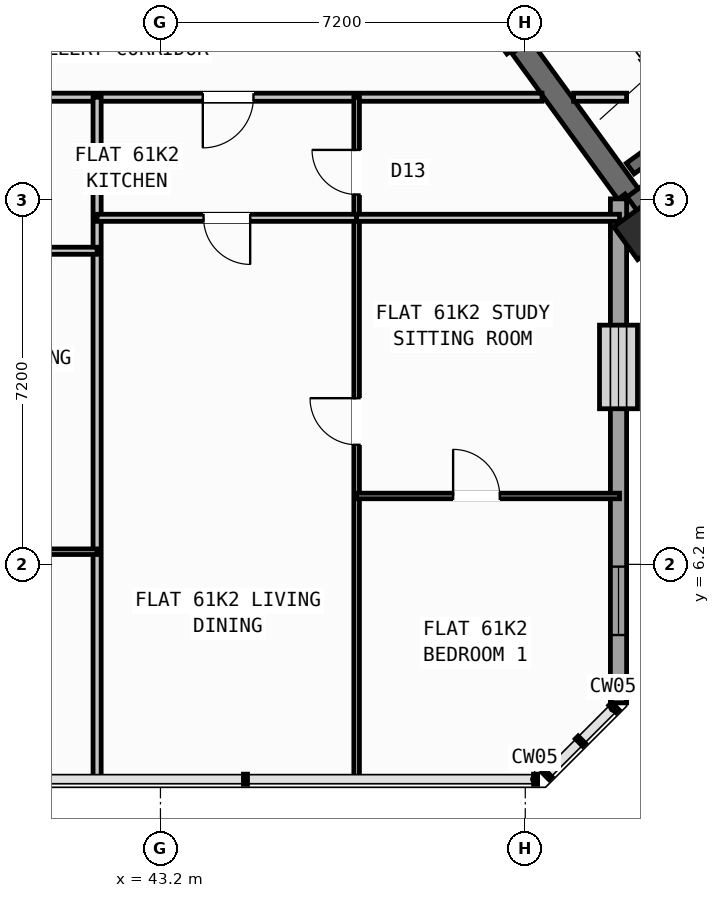
"""IFC4 building model, lengths in metres.
Left out: names, types, materials, properties, quantities, classifications, styles, units other than length and angle.
Written with IfcOpenShell. Run it as: python <this file> out.ifc"""

import sys

from ifc_helpers import new_model, si_unit, direction, frame, frame_2d, origin, origin_2d, place, context, subcontext, project, spatial, rectangle, hollow_rectangle, extrude, source, transform, mapped, element, fill, save


model = new_model("IFC4")
c1 = context("Model", 3, precision=1e-05, world=origin(), true_north=direction((0.0, 1.0)))
c2 = subcontext(c1, "Body", "Model", "MODEL_VIEW")
j1 = project(units=[si_unit("LENGTHUNIT", "METRE"), si_unit("PLANEANGLEUNIT", "RADIAN")], contexts=[c1])
p1 = place(None, origin())
s1 = spatial("IfcSite", under=j1, at=p1, CompositionType="ELEMENT")
p2 = place(p1, origin())
s2 = spatial("IfcBuilding", under=s1, at=p2, CompositionType="ELEMENT")
p3 = place(p2, frame((0.0, 0.0, 242.1)))
s3 = spatial("IfcBuildingStorey", under=s2, at=p3, CompositionType="ELEMENT", Elevation=242.1)
p4 = place(p3, frame((52.399, 13.169, 0.0), z_axis=(0.0, 0.0, 1.0), x_axis=(0.809022352778, 0.587777877013, 0.0)))
e1 = element("IfcWall", 1, at=p4, inside=s3, PredefinedType="SHEAR", context=c2, shape_type="SweptSolid", body=[
    extrude(rectangle(XDim=12.24, YDim=0.45, at=frame_2d((6.12, 0.0))), origin(), (0.0, 0.0, 1.0), 3.32),
])
p5 = place(p3, frame((52.449, 13.483, 0.0), z_axis=(0.0, 0.0, 1.0), x_axis=(-0.587819244441, 0.808992296542, 0.0)))
e2 = element("IfcWall", 2, at=p5, inside=s3, PredefinedType="SHEAR", context=c2, shape_type="SweptSolid", body=[
    extrude(rectangle(XDim=3.625, YDim=0.45, at=frame_2d((1.812, 0.0))), origin(), (0.0, 0.0, 1.0), 3.32),
])
m1 = source(origin(), c2, "Body", "SweptSolid", [
    extrude(hollow_rectangle(XDim=0.8, YDim=0.8, WallThickness=0.032, at=origin_2d()), origin(), (0.0, 0.0, 1.0), 3.6),
])
p6 = place(p3, frame((52.705, 12.773, 0.0), z_axis=(0.0, 0.0, 1.0), x_axis=(0.809016994375, 0.587785252292, 0.0)))
e3 = element("IfcColumn", 3, at=p6, inside=s3, PredefinedType="COLUMN", context=c2, shape_type="MappedRepresentation", body=[
    mapped(m1, transform((0.0, 0.0, 0.0), scale=1.0)),
])
p7 = place(p3, frame((56.581, 7.439, 0.0), z_axis=(0.0, 0.0, 1.0), x_axis=(-0.587776558368, 0.809023310809, 0.0)))
e4 = element("IfcWall", 4, at=p7, inside=s3, PredefinedType="STANDARD", context=c2, shape_type="SweptSolid", body=[
    extrude(rectangle(XDim=7.385, YDim=0.32, at=frame_2d((3.693, 0.0))), origin(), (0.0, 0.0, 1.0), 2.845),
])
p8 = place(p7, frame((1.731, 0.0, 0.9)))
e5 = element("IfcOpeningElement", 5, at=p8, cuts=e4, PredefinedType="OPENING", context=c2, shape_type="SweptSolid", body=[
    extrude(rectangle(XDim=1.65, YDim=1.45, at=frame_2d((0.825, 0.725))), frame((0.0, 0.17, 0.0), z_axis=(0.0, -1.0, 0.0), x_axis=(1.0, 0.0, 0.0)), (0.0, 0.0, 1.0), 0.34),
])
p9 = place(p3, frame((52.24, 13.414, 0.0), z_axis=(0.0, 0.0, 1.0), x_axis=(0.0, -1.0, 0.0)))
e6 = element("IfcWall", 6, at=p9, inside=s3, PredefinedType="STANDARD", context=c2, shape_type="SweptSolid", body=[
    extrude(rectangle(XDim=9.948, YDim=0.32, at=frame_2d((4.974, 0.0))), origin(), (0.0, 0.0, 1.0), 3.32),
])
p10 = place(p9, frame((2.492, 0.0, 0.9)))
e7 = element("IfcOpeningElement", 7, at=p10, cuts=e6, PredefinedType="OPENING", context=c2, shape_type="SweptSolid", body=[
    extrude(rectangle(XDim=1.65, YDim=1.45, at=frame_2d((0.825, 0.725))), frame((0.0, 0.17, 0.0), z_axis=(0.0, -1.0, 0.0), x_axis=(1.0, 0.0, 0.0)), (0.0, 0.0, 1.0), 0.34),
])
p11 = place(p9, frame((7.258, 0.0, 0.9)))
e8 = element("IfcOpeningElement", 8, at=p11, cuts=e6, PredefinedType="OPENING", context=c2, shape_type="SweptSolid", body=[
    extrude(rectangle(XDim=1.35, YDim=1.45, at=frame_2d((0.675, 0.725))), frame((0.0, 0.17, 0.0), z_axis=(0.0, -1.0, 0.0), x_axis=(1.0, 0.0, 0.0)), (0.0, 0.0, 1.0), 0.34),
])
p12 = place(p3, frame((52.472, 14.013, 0.0), z_axis=(0.0, 0.0, 1.0), x_axis=(0.809028366311, 0.587769599847, 0.0)))
e9 = element("IfcWall", 9, at=p12, inside=s3, PredefinedType="SHEAR", context=c2, shape_type="SweptSolid", body=[
    extrude(rectangle(XDim=7.33, YDim=0.26, at=frame_2d((3.665, 0.0))), origin(), (0.0, 0.0, 1.0), 3.32),
])
p13 = place(p3, frame((35.178, 15.42, 0.0), z_axis=(0.0, 0.0, 1.0), x_axis=(1.0, 0.0, 0.0)))
e10 = element("IfcWall", 10, at=p13, inside=s3, PredefinedType="PARTITIONING", context=c2, shape_type="SweptSolid", body=[
    extrude(rectangle(XDim=15.552, YDim=0.16, at=frame_2d((7.776, 0.0))), origin(), (0.0, 0.0, 1.0), 3.31),
])
p14 = place(p13, frame((1.028, 0.0, 0.0)))
e11 = element("IfcOpeningElement", 11, at=p14, cuts=e10, PredefinedType="OPENING", context=c2, shape_type="SweptSolid", body=[
    extrude(rectangle(XDim=1.0, YDim=2.1, at=frame_2d((0.5, 1.05))), frame((0.0, 0.09, 0.0), z_axis=(0.0, -1.0, 0.0), x_axis=(1.0, 0.0, 0.0)), (0.0, 0.0, 1.0), 0.18),
])
p15 = place(p13, frame((8.858, 0.0, 0.0)))
e12 = element("IfcOpeningElement", 12, at=p15, cuts=e10, PredefinedType="OPENING", context=c2, shape_type="SweptSolid", body=[
    extrude(rectangle(XDim=1.0, YDim=2.1, at=frame_2d((0.5, 1.05))), frame((0.0, 0.09, 0.0), z_axis=(0.0, -1.0, 0.0), x_axis=(1.0, 0.0, 0.0)), (0.0, 0.0, 1.0), 0.18),
])
p16 = place(p3, frame((51.354, 15.42, 0.0), z_axis=(0.0, 0.0, 1.0), x_axis=(1.0, 0.0, 0.0)))
e13 = element("IfcWall", 13, at=p16, inside=s3, PredefinedType="PARTITIONING", context=c2, shape_type="SweptSolid", body=[
    extrude(rectangle(XDim=1.046, YDim=0.16, at=frame_2d((0.523, 0.0))), origin(), (0.0, 0.0, 1.0), 3.31),
])
p17 = place(p3, frame((50.119, 16.333, 0.0), z_axis=(0.0, 0.0, 1.0), x_axis=(-0.587749856981, 0.809042709391, 0.0)))
e14 = element("IfcWall", 14, at=p17, inside=s3, PredefinedType="STANDARD", context=c2, shape_type="SweptSolid", body=[
    extrude(rectangle(XDim=2.96, YDim=0.2, at=frame_2d((1.48, 0.0))), origin(), (0.0, 0.0, 1.0), 3.31),
])
p18 = place(p17, frame((0.53, 0.0, 0.0)))
e15 = element("IfcOpeningElement", 15, at=p18, cuts=e14, PredefinedType="OPENING", context=c2, shape_type="SweptSolid", body=[
    extrude(rectangle(XDim=1.5, YDim=2.15, at=frame_2d((0.75, 1.075))), frame((0.0, 0.11, 0.0), z_axis=(0.0, -1.0, 0.0), x_axis=(1.0, 0.0, 0.0)), (0.0, 0.0, 1.0), 0.22),
])
p19 = place(p3, frame((41.95, 1.96, 0.0), z_axis=(0.0, 0.0, 1.0), x_axis=(0.0, 1.0, 0.0)))
e16 = element("IfcWall", 16, at=p19, inside=s3, PredefinedType="PARTITIONING", context=c2, shape_type="SweptSolid", body=[
    extrude(rectangle(XDim=13.46, YDim=0.16, at=frame_2d((6.73, 0.0))), origin(), (0.0, 0.0, 1.0), 3.31),
])
p20 = place(p3, frame((37.813, 12.39, 0.0), z_axis=(0.0, 0.0, 1.0), x_axis=(1.0, 0.0, 0.0)))
e17 = element("IfcWall", 17, at=p20, inside=s3, PredefinedType="PLUMBINGWALL", context=c2, shape_type="SweptSolid", body=[
    extrude(rectangle(XDim=4.137, YDim=0.14, at=frame_2d((2.068, 0.0))), origin(), (0.0, 0.0, 1.0), 2.495),
])
p21 = place(p3, frame((37.813, 6.45, 0.0), z_axis=(0.0, 0.0, 1.0), x_axis=(1.0, 0.0, 0.0)))
e18 = element("IfcWall", 18, at=p21, inside=s3, PredefinedType="PARTITIONING", context=c2, shape_type="SweptSolid", body=[
    extrude(rectangle(XDim=4.137, YDim=0.11, at=frame_2d((2.068, 0.0))), origin(), (0.0, 0.0, 1.0), 3.31),
])
p22 = place(p21, frame((1.608, 0.0, 0.0)))
e19 = element("IfcOpeningElement", 19, at=p22, cuts=e18, PredefinedType="OPENING", context=c2, shape_type="SweptSolid", body=[
    extrude(rectangle(XDim=0.92, YDim=2.08, at=frame_2d((0.46, 1.04))), frame((0.0, 0.065, 0.0), z_axis=(0.0, -1.0, 0.0), x_axis=(1.0, 0.0, 0.0)), (0.0, 0.0, 1.0), 0.13),
])
p23 = place(p3, frame((47.072, 1.96, 0.0), z_axis=(0.0, 0.0, 1.0), x_axis=(0.0, 1.0, 0.0)))
e20 = element("IfcWall", 20, at=p23, inside=s3, PredefinedType="PARTITIONING", context=c2, shape_type="SweptSolid", body=[
    extrude(rectangle(XDim=13.46, YDim=0.11, at=frame_2d((6.73, 0.0))), origin(), (0.0, 0.0, 1.0), 3.31),
])
p24 = place(p23, frame((6.6, 0.0, 0.0)))
e21 = element("IfcOpeningElement", 21, at=p24, cuts=e20, PredefinedType="OPENING", context=c2, shape_type="SweptSolid", body=[
    extrude(rectangle(XDim=0.92, YDim=2.08, at=frame_2d((0.46, 1.04))), frame((0.0, 0.065, 0.0), z_axis=(0.0, -1.0, 0.0), x_axis=(1.0, 0.0, 0.0)), (0.0, 0.0, 1.0), 0.13),
])
p25 = place(p23, frame((11.54, 0.0, 0.0)))
e22 = element("IfcOpeningElement", 22, at=p25, cuts=e20, PredefinedType="OPENING", context=c2, shape_type="SweptSolid", body=[
    extrude(rectangle(XDim=0.88, YDim=2.08, at=frame_2d((0.44, 1.04))), frame((0.0, 0.065, 0.0), z_axis=(0.0, -1.0, 0.0), x_axis=(1.0, 0.0, 0.0)), (0.0, 0.0, 1.0), 0.13),
])
p26 = place(p3, frame((41.95, 13.04, 0.0), z_axis=(0.0, 0.0, 1.0), x_axis=(1.0, 0.0, 0.0)))
e23 = element("IfcWall", 23, at=p26, inside=s3, PredefinedType="PLUMBINGWALL", context=c2, shape_type="SweptSolid", body=[
    extrude(rectangle(XDim=5.122, YDim=0.14, at=frame_2d((2.561, 0.0))), origin(), (0.0, 0.0, 1.0), 3.31),
])
p27 = place(p26, frame((2.101, 0.0, 0.0)))
e24 = element("IfcOpeningElement", 24, at=p27, cuts=e23, PredefinedType="OPENING", context=c2, shape_type="SweptSolid", body=[
    extrude(rectangle(XDim=0.92, YDim=2.08, at=frame_2d((0.46, 1.04))), frame((0.0, 0.08, 0.0), z_axis=(0.0, -1.0, 0.0), x_axis=(1.0, 0.0, 0.0)), (0.0, 0.0, 1.0), 0.16),
])
p28 = place(p3, frame((47.072, 13.04, 0.0), z_axis=(0.0, 0.0, 1.0), x_axis=(1.0, 0.0, 0.0)))
e25 = element("IfcWall", 25, at=p28, inside=s3, PredefinedType="PLUMBINGWALL", context=c2, shape_type="SweptSolid", body=[
    extrude(rectangle(XDim=5.188, YDim=0.14, at=frame_2d((2.594, 0.0))), origin(), (0.0, 0.0, 1.0), 2.495),
])
p29 = place(p3, frame((47.072, 7.55, 0.0), z_axis=(0.0, 0.0, 1.0), x_axis=(1.0, 0.0, 0.0)))
e26 = element("IfcWall", 26, at=p29, inside=s3, PredefinedType="PARTITIONING", context=c2, shape_type="SweptSolid", body=[
    extrude(rectangle(XDim=5.188, YDim=0.11, at=frame_2d((2.594, 0.0))), origin(), (0.0, 0.0, 1.0), 3.31),
])
p30 = place(p29, frame((1.904, 0.0, 0.0)))
e27 = element("IfcOpeningElement", 27, at=p30, cuts=e26, PredefinedType="OPENING", context=c2, shape_type="SweptSolid", body=[
    extrude(rectangle(XDim=0.92, YDim=2.08, at=frame_2d((0.46, 1.04))), frame((0.0, 0.065, 0.0), z_axis=(0.0, -1.0, 0.0), x_axis=(1.0, 0.0, 0.0)), (0.0, 0.0, 1.0), 0.13),
])
m2 = source(origin(), c2, "Body", "SweptSolid", [
    extrude(rectangle(XDim=1.65, YDim=1.45, at=frame_2d((0.825, 0.725))), frame((0.0, 0.03, 0.0), z_axis=(0.0, -1.0, 0.0), x_axis=(1.0, 0.0, 0.0)), (0.0, 0.0, 1.0), 0.06),
])
p31 = place(p10, origin())
e28 = element("IfcWindow", 28, at=p31, inside=s3, PartitioningType="SINGLE_PANEL", PredefinedType="WINDOW", context=c2, shape_type="MappedRepresentation", body=[
    mapped(m2, transform((0.0, 0.0, 0.0), scale=1.0)),
])
fill(e7, e28)
m3 = source(origin(), c2, "Body", "SweptSolid", [
    extrude(rectangle(XDim=1.35, YDim=1.45, at=frame_2d((0.675, 0.725))), frame((0.0, 0.03, 0.0), z_axis=(0.0, -1.0, 0.0), x_axis=(1.0, 0.0, 0.0)), (0.0, 0.0, 1.0), 0.06),
])
p32 = place(p11, origin())
e29 = element("IfcWindow", 29, at=p32, inside=s3, PartitioningType="SINGLE_PANEL", PredefinedType="WINDOW", context=c2, shape_type="MappedRepresentation", body=[
    mapped(m3, transform((0.0, 0.0, 0.0), scale=1.0)),
])
fill(e8, e29)
m4 = source(origin(), c2, "Body", "SweptSolid", [
    extrude(rectangle(XDim=0.92, YDim=2.08, at=frame_2d((0.46, 1.04))), frame((0.0, 0.025, 0.0), z_axis=(0.0, -1.0, 0.0), x_axis=(1.0, 0.0, 0.0)), (0.0, 0.0, 1.0), 0.05),
])
p33 = place(p24, origin())
e30 = element("IfcDoor", 30, at=p33, inside=s3, OperationType="SINGLE_SWING_RIGHT", PredefinedType="DOOR", context=c2, shape_type="MappedRepresentation", body=[
    mapped(m4, transform((0.0, 0.0, 0.0), scale=1.0)),
])
fill(e21, e30)
p34 = place(p30, origin())
e31 = element("IfcDoor", 31, at=p34, inside=s3, OperationType="SINGLE_SWING_LEFT", PredefinedType="DOOR", context=c2, shape_type="MappedRepresentation", body=[
    mapped(m4, transform((0.0, 0.0, 0.0), scale=1.0)),
])
fill(e27, e31)
m5 = source(origin(), c2, "Body", "SweptSolid", [
    extrude(rectangle(XDim=1.0, YDim=2.1, at=frame_2d((0.5, 1.05))), frame((0.0, 0.025, 0.0), z_axis=(0.0, -1.0, 0.0), x_axis=(1.0, 0.0, 0.0)), (0.0, 0.0, 1.0), 0.05),
])
p35 = place(p15, frame((1.0, 0.0, 0.0), z_axis=(0.0, 0.0, 1.0), x_axis=(-1.0, 0.0, 0.0)))
e32 = element("IfcDoor", 32, at=p35, inside=s3, OperationType="SINGLE_SWING_RIGHT", PredefinedType="DOOR", context=c2, shape_type="MappedRepresentation", body=[
    mapped(m5, transform((0.0, 0.0, 0.0), scale=1.0)),
])
fill(e12, e32)
p36 = place(p27, frame((0.92, 0.0, 0.0), z_axis=(0.0, 0.0, 1.0), x_axis=(-1.0, 0.0, 0.0)))
e33 = element("IfcDoor", 33, at=p36, inside=s3, OperationType="SINGLE_SWING_LEFT", PredefinedType="DOOR", context=c2, shape_type="MappedRepresentation", body=[
    mapped(m4, transform((0.0, 0.0, 0.0), scale=1.0)),
])
fill(e24, e33)
m6 = source(origin(), c2, "Body", "SweptSolid", [
    extrude(rectangle(XDim=0.88, YDim=2.08, at=frame_2d((0.44, 1.04))), frame((0.0, 0.025, 0.0), z_axis=(0.0, -1.0, 0.0), x_axis=(1.0, 0.0, 0.0)), (0.0, 0.0, 1.0), 0.05),
])
p37 = place(p25, origin())
e34 = element("IfcDoor", 34, at=p37, inside=s3, OperationType="SINGLE_SWING_RIGHT", PredefinedType="DOOR", context=c2, shape_type="MappedRepresentation", body=[
    mapped(m6, transform((0.0, 0.0, 0.0), scale=1.0)),
])
fill(e22, e34)
save(model, sys.argv[1])
